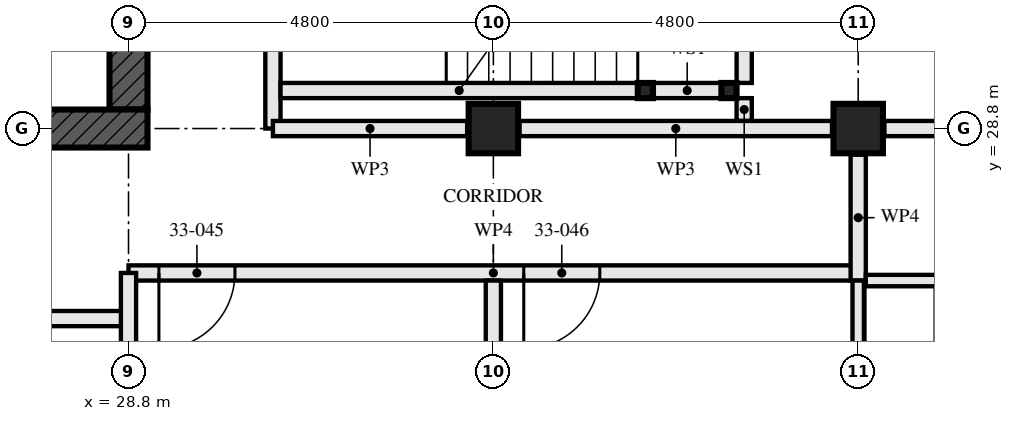
"""IFC4 building model, lengths in metres.
Left out: names, types, materials, properties, quantities, classifications, styles, units other than length and angle.
Written with IfcOpenShell. Run it as: python <this file> out.ifc"""

import sys

from ifc_helpers import new_model, si_unit, direction, frame, frame_2d, origin, origin_2d, place, context, subcontext, project, spatial, rectangle, hollow_rectangle, extrude, element, fill, save


model = new_model("IFC4")
c1 = context("Model", 3, precision=1e-05, world=origin(), true_north=direction((0.0, 1.0)))
c2 = subcontext(c1, "Body", "Model", "MODEL_VIEW")
j1 = project(units=[si_unit("LENGTHUNIT", "METRE"), si_unit("PLANEANGLEUNIT", "RADIAN")], contexts=[c1])
p1 = place(None, origin())
s1 = spatial("IfcSite", under=j1, at=p1, CompositionType="ELEMENT")
p2 = place(p1, origin())
s2 = spatial("IfcBuilding", under=s1, at=p2, CompositionType="ELEMENT")
p3 = place(p2, frame((0.0, 0.0, 122.5)))
s3 = spatial("IfcBuildingStorey", under=s2, at=p3, CompositionType="ELEMENT", Elevation=122.5)
for number, where, z_axis, x_axis in (
    (1, (33.6, 28.8, 0.0), (0.0, 0.0, 1.0), (0.0, 1.0, 0.0)),
    (2, (38.4, 28.8, 0.0), (0.0, 0.0, 1.0), (0.0, 1.0, 0.0)),
):
    element("IfcColumn", number, at=place(p3, frame(where, z_axis=z_axis, x_axis=x_axis)), inside=s3, PredefinedType="COLUMN", context=c2, shape_type="SweptSolid", body=[
        extrude(hollow_rectangle(XDim=0.65, YDim=0.65, WallThickness=0.05, at=origin_2d()), origin(), (0.0, 0.0, 1.0), 3.5),
    ])
p4 = place(p3, frame((14.15, 28.8, -0.17), z_axis=(0.0, 0.0, 1.0), x_axis=(1.0, 0.0, 0.0)))
e3 = element("IfcWall", 3, at=p4, inside=s3, PredefinedType="SHEAR", context=c2, shape_type="SweptSolid", body=[
    extrude(rectangle(XDim=14.9, YDim=0.5, at=frame_2d((7.45, 0.0))), origin(), (0.0, 0.0, 1.0), 3.5),
])
p5 = place(p4, frame((6.85, 0.0, 0.17)))
e4 = element("IfcOpeningElement", 4, at=p5, cuts=e3, PredefinedType="OPENING", context=c2, shape_type="SweptSolid", body=[
    extrude(rectangle(XDim=1.2, YDim=2.1, at=frame_2d((0.6, 1.05))), frame((0.0, 0.26, 0.0), z_axis=(0.0, -1.0, 0.0), x_axis=(1.0, 0.0, 0.0)), (0.0, 0.0, 1.0), 0.521),
])
p6 = place(p3, frame((28.8, 29.05, -0.17), z_axis=(0.0, 0.0, 1.0), x_axis=(0.0, 1.0, 0.0)))
e5 = element("IfcWall", 5, at=p6, inside=s3, PredefinedType="SHEAR", context=c2, shape_type="SweptSolid", body=[
    extrude(rectangle(XDim=13.9, YDim=0.5, at=frame_2d((6.95, 0.0))), origin(), (0.0, 0.0, 1.0), 3.5),
])
p7 = place(p6, frame((6.35, 0.0, 0.17)))
e6 = element("IfcOpeningElement", 6, at=p7, cuts=e5, PredefinedType="OPENING", context=c2, shape_type="SweptSolid", body=[
    extrude(rectangle(XDim=1.2, YDim=2.1, at=frame_2d((0.6, 1.05))), frame((0.0, 0.26, 0.0), z_axis=(0.0, -1.0, 0.0), x_axis=(1.0, 0.0, 0.0)), (0.0, 0.0, 1.0), 0.521),
])
for number, where, z_axis, x_axis in (
    (7, (36.7, 29.3, 0.0), (0.0, 0.0, 1.0), (1.0, 0.0, 0.0)),
    (8, (35.6, 29.3, 0.0), (0.0, 0.0, 1.0), (1.0, 0.0, 0.0)),
):
    element("IfcColumn", number, at=place(p3, frame(where, z_axis=z_axis, x_axis=x_axis)), inside=s3, PredefinedType="COLUMN", context=c2, shape_type="SweptSolid", body=[
        extrude(hollow_rectangle(XDim=0.2, YDim=0.2, WallThickness=0.008, at=origin_2d()), origin(), (0.0, 0.0, 1.0), 3.33),
    ])
p8 = place(p3, frame((17.8, 26.3, 0.0), z_axis=(0.0, 0.0, 1.0), x_axis=(1.0, 0.0, 0.0)))
e9 = element("IfcWall", 9, at=p8, inside=s3, PredefinedType="PARTITIONING", context=c2, shape_type="SweptSolid", body=[
    extrude(rectangle(XDim=11.0, YDim=0.2, at=frame_2d((5.5, 0.0))), origin(), (0.0, 0.0, 1.0), 2.55),
])
p9 = place(p8, frame((0.25, 0.0, 0.0)))
e10 = element("IfcOpeningElement", 10, at=p9, cuts=e9, PredefinedType="OPENING", context=c2, shape_type="SweptSolid", body=[
    extrude(rectangle(XDim=0.9, YDim=2.1, at=frame_2d((0.45, 1.05))), frame((0.0, 0.111, 0.0), z_axis=(0.0, -1.0, 0.0), x_axis=(1.0, 0.0, 0.0)), (0.0, 0.0, 1.0), 0.221),
])
p10 = place(p8, frame((1.8, 0.0, 0.0)))
e11 = element("IfcOpeningElement", 11, at=p10, cuts=e9, PredefinedType="OPENING", context=c2, shape_type="SweptSolid", body=[
    extrude(rectangle(XDim=1.0, YDim=2.1, at=frame_2d((0.5, 1.05))), frame((0.0, 0.111, 0.0), z_axis=(0.0, -1.0, 0.0), x_axis=(1.0, 0.0, 0.0)), (0.0, 0.0, 1.0), 0.221),
])
p11 = place(p3, frame((33.6, 14.72, 0.0), z_axis=(0.0, 0.0, 1.0), x_axis=(0.0, 1.0, 0.0)))
e12 = element("IfcWall", 12, at=p11, inside=s3, PredefinedType="PARTITIONING", context=c2, shape_type="SweptSolid", body=[
    extrude(rectangle(XDim=12.08, YDim=0.2, at=frame_2d((6.04, 0.0))), origin(), (0.0, 0.0, 1.0), 2.55),
])
p12 = place(p3, frame((38.4, 23.8, 0.0), z_axis=(0.0, 0.0, 1.0), x_axis=(0.0, 1.0, 0.0)))
e13 = element("IfcWall", 13, at=p12, inside=s3, PredefinedType="PARTITIONING", context=c2, shape_type="SweptSolid", body=[
    extrude(rectangle(XDim=3.0, YDim=0.15, at=frame_2d((1.5, 0.0))), origin(), (0.0, 0.0, 1.0), 2.55),
])
p13 = place(p3, frame((28.8, 26.9, 0.0), z_axis=(0.0, 0.0, 1.0), x_axis=(1.0, 0.0, 0.0)))
e14 = element("IfcWall", 14, at=p13, inside=s3, PredefinedType="PARTITIONING", context=c2, shape_type="SweptSolid", body=[
    extrude(rectangle(XDim=9.6, YDim=0.2, at=frame_2d((4.8, 0.0))), origin(), (0.0, 0.0, 1.0), 3.33),
])
p14 = place(p13, frame((0.4, 0.0, 0.0)))
e15 = element("IfcOpeningElement", 15, at=p14, cuts=e14, PredefinedType="OPENING", context=c2, shape_type="SweptSolid", body=[
    extrude(rectangle(XDim=1.0, YDim=2.1, at=frame_2d((0.5, 1.05))), frame((0.0, 0.111, 0.0), z_axis=(0.0, -1.0, 0.0), x_axis=(1.0, 0.0, 0.0)), (0.0, 0.0, 1.0), 0.221),
])
p15 = place(p13, frame((5.2, 0.0, 0.0)))
e16 = element("IfcOpeningElement", 16, at=p15, cuts=e14, PredefinedType="OPENING", context=c2, shape_type="SweptSolid", body=[
    extrude(rectangle(XDim=1.0, YDim=2.1, at=frame_2d((0.5, 1.05))), frame((0.0, 0.111, 0.0), z_axis=(0.0, -1.0, 0.0), x_axis=(1.0, 0.0, 0.0)), (0.0, 0.0, 1.0), 0.221),
])
p16 = place(p3, frame((38.4, 26.8, 0.0), z_axis=(0.0, 0.0, 1.0), x_axis=(0.0, 1.0, 0.0)))
e17 = element("IfcWall", 17, at=p16, inside=s3, PredefinedType="PARTITIONING", context=c2, shape_type="SweptSolid", body=[
    extrude(rectangle(XDim=1.655, YDim=0.2, at=frame_2d((0.828, 0.0))), origin(), (0.0, 0.0, 1.0), 3.33),
])
p17 = place(p3, frame((36.6, 29.3, 0.0), z_axis=(0.0, 0.0, 1.0), x_axis=(-1.0, 0.0, 0.0)))
e18 = element("IfcWall", 18, at=p17, inside=s3, PredefinedType="SOLIDWALL", context=c2, shape_type="SweptSolid", body=[
    extrude(rectangle(XDim=0.9, YDim=0.2, at=frame_2d((0.45, 0.0))), origin(), (0.0, 0.0, 1.0), 2.99),
])
p18 = place(p3, frame((35.5, 29.3, 0.0), z_axis=(0.0, 0.0, 1.0), x_axis=(-1.0, 0.0, 0.0)))
e19 = element("IfcWall", 19, at=p18, inside=s3, PredefinedType="SOLIDWALL", context=c2, shape_type="SweptSolid", body=[
    extrude(rectangle(XDim=4.7, YDim=0.2, at=frame_2d((2.35, 0.0))), origin(), (0.0, 0.0, 1.0), 2.99),
])
p19 = place(p3, frame((36.9, 28.9, 0.0), z_axis=(0.0, 0.0, 1.0), x_axis=(0.0, 1.0, 0.0)))
e20 = element("IfcWall", 20, at=p19, inside=s3, PredefinedType="SOLIDWALL", context=c2, shape_type="SweptSolid", body=[
    extrude(rectangle(XDim=0.3, YDim=0.2, at=frame_2d((0.15, 0.0))), origin(), (0.0, 0.0, 1.0), 3.33),
])
p20 = place(p3, frame((36.9, 29.4, 0.0), z_axis=(0.0, 0.0, 1.0), x_axis=(0.0, 1.0, 0.0)))
e21 = element("IfcWall", 21, at=p20, inside=s3, PredefinedType="SOLIDWALL", context=c2, shape_type="SweptSolid", body=[
    extrude(rectangle(XDim=2.6, YDim=0.2, at=frame_2d((1.3, 0.0))), origin(), (0.0, 0.0, 1.0), 3.33),
])
p21 = place(p3, frame((30.7, 28.8, 0.0), z_axis=(0.0, 0.0, 1.0), x_axis=(0.0, 1.0, 0.0)))
e22 = element("IfcWall", 22, at=p21, inside=s3, PredefinedType="PARTITIONING", context=c2, shape_type="SweptSolid", body=[
    extrude(rectangle(XDim=14.84, YDim=0.2, at=frame_2d((7.42, 0.0))), origin(), (0.0, 0.0, 1.0), 2.32),
])
p22 = place(p21, frame((1.4, 0.0, 0.0)))
e23 = element("IfcOpeningElement", 23, at=p22, cuts=e22, PredefinedType="OPENING", context=c2, shape_type="SweptSolid", body=[
    extrude(rectangle(XDim=1.0, YDim=2.1, at=frame_2d((0.5, 1.05))), frame((0.0, 0.111, 0.0), z_axis=(0.0, -1.0, 0.0), x_axis=(1.0, 0.0, 0.0)), (0.0, 0.0, 1.0), 0.221),
])
p23 = place(p21, frame((4.1, 0.0, 0.0)))
e24 = element("IfcOpeningElement", 24, at=p23, cuts=e22, PredefinedType="OPENING", context=c2, shape_type="SweptSolid", body=[
    extrude(rectangle(XDim=1.0, YDim=2.1, at=frame_2d((0.5, 1.05))), frame((0.0, 0.111, 0.0), z_axis=(0.0, -1.0, 0.0), x_axis=(1.0, 0.0, 0.0)), (0.0, 0.0, 1.0), 0.221),
])
p24 = place(p21, frame((5.975, 0.0, 0.0)))
e25 = element("IfcOpeningElement", 25, at=p24, cuts=e22, PredefinedType="OPENING", context=c2, shape_type="SweptSolid", body=[
    extrude(rectangle(XDim=1.0, YDim=2.1, at=frame_2d((0.5, 1.05))), frame((0.0, 0.111, 0.0), z_axis=(0.0, -1.0, 0.0), x_axis=(1.0, 0.0, 0.0)), (0.0, 0.0, 1.0), 0.221),
])
p25 = place(p21, frame((13.0, 0.0, 0.0)))
e26 = element("IfcOpeningElement", 26, at=p25, cuts=e22, PredefinedType="OPENING", context=c2, shape_type="SweptSolid", body=[
    extrude(rectangle(XDim=1.0, YDim=2.1, at=frame_2d((0.5, 1.05))), frame((0.0, 0.111, 0.0), z_axis=(0.0, -1.0, 0.0), x_axis=(1.0, 0.0, 0.0)), (0.0, 0.0, 1.0), 0.221),
])
p26 = place(p3, frame((28.8, 24.345, 0.0), z_axis=(0.0, 0.0, 1.0), x_axis=(0.0, 1.0, 0.0)))
e27 = element("IfcWall", 27, at=p26, inside=s3, PredefinedType="PARTITIONING", context=c2, shape_type="SweptSolid", body=[
    extrude(rectangle(XDim=2.555, YDim=0.2, at=frame_2d((1.277, 0.0))), origin(), (0.0, 0.0, 1.0), 2.32),
])
p27 = place(p3, frame((42.88, 28.8, 0.0), z_axis=(0.0, 0.0, 1.0), x_axis=(-1.0, 0.0, 0.0)))
e28 = element("IfcWall", 28, at=p27, inside=s3, PredefinedType="PARTITIONING", context=c2, shape_type="SweptSolid", body=[
    extrude(rectangle(XDim=4.135, YDim=0.2, at=frame_2d((2.067, 0.0))), origin(), (0.0, 0.0, 1.0), 2.32),
])
p28 = place(p3, frame((38.055, 28.8, 0.0), z_axis=(0.0, 0.0, 1.0), x_axis=(-1.0, 0.0, 0.0)))
e29 = element("IfcWall", 29, at=p28, inside=s3, PredefinedType="PARTITIONING", context=c2, shape_type="SweptSolid", body=[
    extrude(rectangle(XDim=4.11, YDim=0.2, at=frame_2d((2.055, 0.0))), origin(), (0.0, 0.0, 1.0), 2.32),
])
p29 = place(p3, frame((33.255, 28.8, 0.0), z_axis=(0.0, 0.0, 1.0), x_axis=(-1.0, 0.0, 0.0)))
e30 = element("IfcWall", 30, at=p29, inside=s3, PredefinedType="PARTITIONING", context=c2, shape_type="SweptSolid", body=[
    extrude(rectangle(XDim=2.555, YDim=0.2, at=frame_2d((1.277, 0.0))), origin(), (0.0, 0.0, 1.0), 2.32),
])
p30 = place(p3, frame((38.5, 26.8, 0.0), z_axis=(0.0, 0.0, 1.0), x_axis=(1.0, 0.0, 0.0)))
e31 = element("IfcWall", 31, at=p30, inside=s3, PredefinedType="PARTITIONING", context=c2, shape_type="SweptSolid", body=[
    extrude(rectangle(XDim=5.14, YDim=0.15, at=frame_2d((2.57, 0.0))), origin(), (0.0, 0.0, 1.0), 2.32),
])
p31 = place(p14, frame((1.0, 0.0, 0.0), z_axis=(0.0, 0.0, 1.0), x_axis=(-1.0, 0.0, 0.0)))
e32 = element("IfcDoor", 32, at=p31, inside=s3, OperationType="SINGLE_SWING_LEFT", PredefinedType="DOOR", context=c2, shape_type="SweptSolid", body=[
    extrude(rectangle(XDim=1.0, YDim=2.1, at=frame_2d((0.5, 1.05))), frame((0.0, 0.027, 0.0), z_axis=(0.0, -1.0, 0.0), x_axis=(1.0, 0.0, 0.0)), (0.0, 0.0, 1.0), 0.054),
])
fill(e15, e32)
p32 = place(p15, frame((1.0, 0.0, 0.0), z_axis=(0.0, 0.0, 1.0), x_axis=(-1.0, 0.0, 0.0)))
e33 = element("IfcDoor", 33, at=p32, inside=s3, OperationType="SINGLE_SWING_LEFT", PredefinedType="DOOR", context=c2, shape_type="SweptSolid", body=[
    extrude(rectangle(XDim=1.0, YDim=2.1, at=frame_2d((0.5, 1.05))), frame((0.0, 0.027, 0.0), z_axis=(0.0, -1.0, 0.0), x_axis=(1.0, 0.0, 0.0)), (0.0, 0.0, 1.0), 0.054),
])
fill(e16, e33)
save(model, sys.argv[1])
